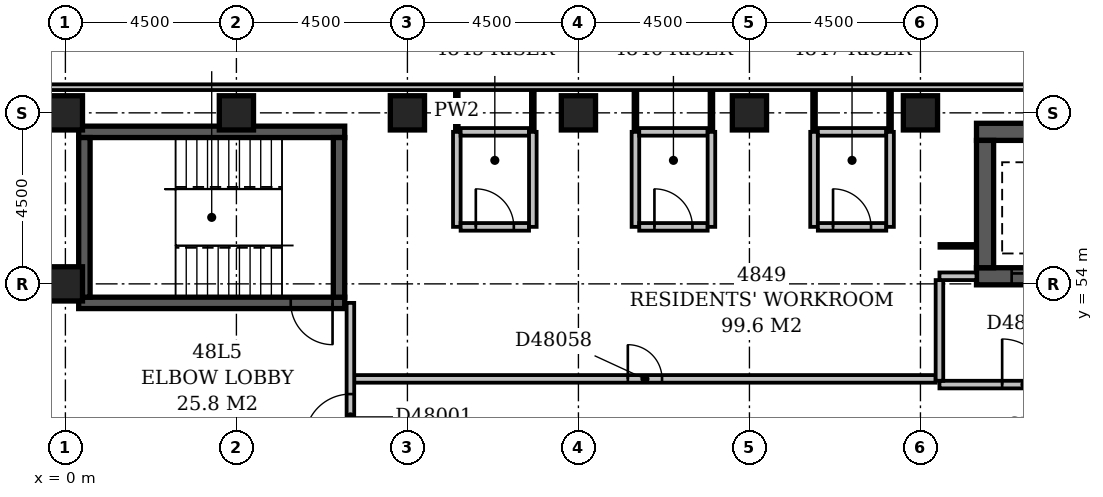
"""IFC4 building model, lengths in metres.
Left out: names, types, materials, properties, quantities, classifications, styles, units other than length and angle.
Written with IfcOpenShell. Run it as: python <this file> out.ifc"""

import sys

from ifc_helpers import new_model, si_unit, direction, frame, frame_2d, origin, origin_2d, place, context, subcontext, project, spatial, rectangle, extrude, element, fill, save


model = new_model("IFC4")
c1 = context("Model", 3, precision=1e-05, world=origin(), true_north=direction((0.0, 1.0)))
c2 = subcontext(c1, "Body", "Model", "MODEL_VIEW")
j1 = project(units=[si_unit("LENGTHUNIT", "METRE"), si_unit("PLANEANGLEUNIT", "RADIAN")], contexts=[c1])
p1 = place(None, origin())
s1 = spatial("IfcSite", under=j1, at=p1, CompositionType="ELEMENT")
p2 = place(p1, origin())
s2 = spatial("IfcBuilding", under=s1, at=p2, CompositionType="ELEMENT")
p3 = place(p2, frame((0.0, 0.0, 189.8)))
s3 = spatial("IfcBuildingStorey", under=s2, at=p3, CompositionType="ELEMENT", Elevation=189.8)
p4 = place(p3, frame((0.35, 53.5, -0.3), z_axis=(0.0, 0.0, 1.0), x_axis=(1.0, 0.0, 0.0)))
e1 = element("IfcWall", 1, at=p4, inside=s3, PredefinedType="SHEAR", context=c2, shape_type="SweptSolid", body=[
    extrude(rectangle(XDim=7.0, YDim=0.3, at=frame_2d((3.5, 0.0))), origin(), (0.0, 0.0, 1.0), 3.6),
])
p5 = place(p4, frame((5.58, 0.0, 0.3)))
e2 = element("IfcOpeningElement", 2, at=p5, cuts=e1, PredefinedType="OPENING", context=c2, shape_type="SweptSolid", body=[
    extrude(rectangle(XDim=1.1, YDim=2.1, at=frame_2d((0.55, 1.05))), frame((0.0, 0.162, 0.0), z_axis=(0.0, -1.0, 0.0), x_axis=(1.0, 0.0, 0.0)), (0.0, 0.0, 1.0), 0.324),
])
p6 = place(p3, frame((0.35, 58.0, -0.3), z_axis=(0.0, 0.0, 1.0), x_axis=(1.0, 0.0, 0.0)))
e3 = element("IfcWall", 3, at=p6, inside=s3, PredefinedType="SHEAR", context=c2, shape_type="SweptSolid", body=[
    extrude(rectangle(XDim=7.0, YDim=0.3, at=frame_2d((3.5, 0.0))), origin(), (0.0, 0.0, 1.0), 3.6),
])
for number, where, z_axis, x_axis in (
    (4, (0.5, 53.65, -0.3), (0.0, 0.0, 1.0), (0.0, 1.0, 0.0)),
    (5, (7.2, 53.65, -0.3), (0.0, 0.0, 1.0), (0.0, 1.0, 0.0)),
):
    element("IfcWall", number, at=place(p3, frame(where, z_axis=z_axis, x_axis=x_axis)), inside=s3, PredefinedType="SHEAR", context=c2, shape_type="SweptSolid", body=[
        extrude(rectangle(XDim=4.2, YDim=0.3, at=frame_2d((2.1, 0.0))), origin(), (0.0, 0.0, 1.0), 3.6),
    ])
p7 = place(p3, frame((23.975, 54.2, -0.3), z_axis=(0.0, 0.0, 1.0), x_axis=(1.0, 0.0, 0.0)))
e6 = element("IfcWall", 6, at=p7, inside=s3, PredefinedType="SHEAR", context=c2, shape_type="SweptSolid", body=[
    extrude(rectangle(XDim=2.95, YDim=0.45, at=frame_2d((1.475, 0.0))), origin(), (0.0, 0.0, 1.0), 3.6),
])
p8 = place(p7, frame((0.925, 0.0, 0.3)))
e7 = element("IfcOpeningElement", 7, at=p8, cuts=e6, PredefinedType="OPENING", context=c2, shape_type="SweptSolid", body=[
    extrude(rectangle(XDim=1.1, YDim=2.1, at=frame_2d((0.55, 1.05))), frame((0.0, 0.237, 0.0), z_axis=(0.0, -1.0, 0.0), x_axis=(1.0, 0.0, 0.0)), (0.0, 0.0, 1.0), 0.474),
])
p9 = place(p3, frame((23.975, 58.0, -0.3), z_axis=(0.0, 0.0, 1.0), x_axis=(1.0, 0.0, 0.0)))
e8 = element("IfcWall", 8, at=p9, inside=s3, PredefinedType="SHEAR", context=c2, shape_type="SweptSolid", body=[
    extrude(rectangle(XDim=2.95, YDim=0.45, at=frame_2d((1.475, 0.0))), origin(), (0.0, 0.0, 1.0), 3.6),
])
p10 = place(p3, frame((24.2, 54.425, -0.3), z_axis=(0.0, 0.0, 1.0), x_axis=(0.0, 1.0, 0.0)))
e9 = element("IfcWall", 9, at=p10, inside=s3, PredefinedType="SHEAR", context=c2, shape_type="SweptSolid", body=[
    extrude(rectangle(XDim=3.35, YDim=0.45, at=frame_2d((1.675, 0.0))), origin(), (0.0, 0.0, 1.0), 3.6),
])
for number, where, z_axis, x_axis in (
    (10, (0.0, 54.0, -0.3), (0.0, 0.0, 1.0), (1.0, 0.0, 0.0)),
    (11, (0.0, 58.5, -0.3), (0.0, 0.0, 1.0), (1.0, 0.0, 0.0)),
    (12, (4.5, 58.5, -0.3), (0.0, 0.0, 1.0), (1.0, 0.0, 0.0)),
    (13, (9.0, 58.5, -0.3), (0.0, 0.0, 1.0), (1.0, 0.0, 0.0)),
    (14, (13.5, 58.5, -0.3), (0.0, 0.0, 1.0), (1.0, 0.0, 0.0)),
    (15, (18.0, 58.5, -0.3), (0.0, 0.0, 1.0), (1.0, 0.0, 0.0)),
    (16, (22.5, 58.5, -0.3), (0.0, 0.0, 1.0), (1.0, 0.0, 0.0)),
):
    element("IfcColumn", number, at=place(p3, frame(where, z_axis=z_axis, x_axis=x_axis)), inside=s3, PredefinedType="COLUMN", context=c2, shape_type="SweptSolid", body=[
        extrude(rectangle(XDim=0.9, YDim=0.9, at=origin_2d()), origin(), (0.0, 0.0, 1.0), 3.6),
    ])
p11 = place(p3, frame((50.1, 59.175, 0.0), z_axis=(0.0, 0.0, 1.0), x_axis=(-1.0, 0.0, 0.0)))
e17 = element("IfcWall", 17, at=p11, inside=s3, PredefinedType="STANDARD", context=c2, shape_type="SweptSolid", body=[
    extrude(rectangle(XDim=50.85, YDim=0.15, at=frame_2d((25.425, 0.0))), origin(), (0.0, 0.0, 1.0), 2.7),
])
p12 = place(p11, frame((19.65, 0.0, 0.6)))
e18 = element("IfcOpeningElement", 18, at=p12, cuts=e17, PredefinedType="OPENING", context=c2, shape_type="SweptSolid", body=[
    extrude(rectangle(XDim=2.4, YDim=1.8, at=frame_2d((1.2, 0.9))), frame((0.0, 0.087, 0.0), z_axis=(0.0, -1.0, 0.0), x_axis=(1.0, 0.0, 0.0)), (0.0, 0.0, 1.0), 0.174),
])
p13 = place(p3, frame((23.0, 51.35, 0.0), z_axis=(0.0, 0.0, 1.0), x_axis=(1.0, 0.0, 0.0)))
e19 = element("IfcWall", 19, at=p13, inside=s3, PredefinedType="PARTITIONING", context=c2, shape_type="SweptSolid", body=[
    extrude(rectangle(XDim=4.8, YDim=0.2, at=frame_2d((2.4, 0.0))), origin(), (0.0, 0.0, 1.0), 3.3),
])
p14 = place(p13, frame((1.65, 0.0, 0.0)))
e20 = element("IfcOpeningElement", 20, at=p14, cuts=e19, PredefinedType="OPENING", context=c2, shape_type="SweptSolid", body=[
    extrude(rectangle(XDim=1.2, YDim=2.1, at=frame_2d((0.6, 1.05))), frame((0.0, 0.112, 0.0), z_axis=(0.0, -1.0, 0.0), x_axis=(1.0, 0.0, 0.0)), (0.0, 0.0, 1.0), 0.224),
])
p15 = place(p3, frame((23.0, 54.2, 0.0), z_axis=(0.0, 0.0, 1.0), x_axis=(1.0, 0.0, 0.0)))
e21 = element("IfcWall", 21, at=p15, inside=s3, PredefinedType="PARTITIONING", context=c2, shape_type="SweptSolid", body=[
    extrude(rectangle(XDim=0.975, YDim=0.2, at=frame_2d((0.488, 0.0))), origin(), (0.0, 0.0, 1.0), 3.3),
])
p16 = place(p3, frame((23.0, 51.45, 0.0), z_axis=(0.0, 0.0, 1.0), x_axis=(0.0, 1.0, 0.0)))
e22 = element("IfcWall", 22, at=p16, inside=s3, PredefinedType="PARTITIONING", context=c2, shape_type="SweptSolid", body=[
    extrude(rectangle(XDim=2.65, YDim=0.2, at=frame_2d((1.325, 0.0))), origin(), (0.0, 0.0, 1.0), 3.3),
])
p17 = place(p3, frame((7.5, 49.6, 0.0), z_axis=(0.0, 0.0, 1.0), x_axis=(0.0, 1.0, 0.0)))
e23 = element("IfcWall", 23, at=p17, inside=s3, PredefinedType="PARTITIONING", context=c2, shape_type="SweptSolid", body=[
    extrude(rectangle(XDim=3.9, YDim=0.2, at=frame_2d((1.95, 0.0))), origin(), (0.0, 0.0, 1.0), 3.3),
])
p18 = place(p17, frame((0.3, 0.0, 0.0)))
e24 = element("IfcOpeningElement", 24, at=p18, cuts=e23, PredefinedType="OPENING", context=c2, shape_type="SweptSolid", body=[
    extrude(rectangle(XDim=1.2, YDim=2.1, at=frame_2d((0.6, 1.05))), frame((0.0, 0.112, 0.0), z_axis=(0.0, -1.0, 0.0), x_axis=(1.0, 0.0, 0.0)), (0.0, 0.0, 1.0), 0.224),
])
p19 = place(p3, frame((7.6, 51.5, 0.0), z_axis=(0.0, 0.0, 1.0), x_axis=(1.0, 0.0, 0.0)))
e25 = element("IfcWall", 25, at=p19, inside=s3, PredefinedType="PARTITIONING", context=c2, shape_type="SweptSolid", body=[
    extrude(rectangle(XDim=15.3, YDim=0.2, at=frame_2d((7.65, 0.0))), origin(), (0.0, 0.0, 1.0), 3.3),
])
p20 = place(p19, frame((7.2, 0.0, 0.0)))
e26 = element("IfcOpeningElement", 26, at=p20, cuts=e25, PredefinedType="OPENING", context=c2, shape_type="SweptSolid", body=[
    extrude(rectangle(XDim=0.9, YDim=2.1, at=frame_2d((0.45, 1.05))), frame((0.0, 0.112, 0.0), z_axis=(0.0, -1.0, 0.0), x_axis=(1.0, 0.0, 0.0)), (0.0, 0.0, 1.0), 0.224),
])
p21 = place(p3, frame((23.0, 55.0, 0.0), z_axis=(0.0, 0.0, 1.0), x_axis=(1.0, 0.0, 0.0)))
e27 = element("IfcWall", 27, at=p21, inside=s3, PredefinedType="PARTITIONING", context=c2, shape_type="SweptSolid", body=[
    extrude(rectangle(XDim=0.975, YDim=0.1, at=frame_2d((0.488, 0.0))), origin(), (0.0, 0.0, 1.0), 3.3),
])
p22 = place(p3, frame((10.3, 55.5, 0.0), z_axis=(0.0, 0.0, 1.0), x_axis=(0.0, 1.0, 0.0)))
e28 = element("IfcWall", 28, at=p22, inside=s3, PredefinedType="PARTITIONING", context=c2, shape_type="SweptSolid", body=[
    extrude(rectangle(XDim=2.5, YDim=0.2, at=frame_2d((1.25, 0.0))), origin(), (0.0, 0.0, 1.0), 3.3),
])
p23 = place(p3, frame((10.4, 55.5, 0.0), z_axis=(0.0, 0.0, 1.0), x_axis=(1.0, 0.0, 0.0)))
e29 = element("IfcWall", 29, at=p23, inside=s3, PredefinedType="PARTITIONING", context=c2, shape_type="SweptSolid", body=[
    extrude(rectangle(XDim=1.8, YDim=0.2, at=frame_2d((0.9, 0.0))), origin(), (0.0, 0.0, 1.0), 3.3),
])
p24 = place(p23, frame((0.4, 0.0, 0.0)))
e30 = element("IfcOpeningElement", 30, at=p24, cuts=e29, PredefinedType="OPENING", context=c2, shape_type="SweptSolid", body=[
    extrude(rectangle(XDim=1.0, YDim=2.1, at=frame_2d((0.5, 1.05))), frame((0.0, 0.112, 0.0), z_axis=(0.0, -1.0, 0.0), x_axis=(1.0, 0.0, 0.0)), (0.0, 0.0, 1.0), 0.224),
])
for number, where, z_axis, x_axis in (
    (31, (12.3, 55.5, 0.0), (0.0, 0.0, 1.0), (0.0, 1.0, 0.0)),
    (32, (15.0, 55.5, 0.0), (0.0, 0.0, 1.0), (0.0, 1.0, 0.0)),
):
    element("IfcWall", number, at=place(p3, frame(where, z_axis=z_axis, x_axis=x_axis)), inside=s3, PredefinedType="PARTITIONING", context=c2, shape_type="SweptSolid", body=[
        extrude(rectangle(XDim=2.5, YDim=0.2, at=frame_2d((1.25, 0.0))), origin(), (0.0, 0.0, 1.0), 3.3),
    ])
p25 = place(p3, frame((15.1, 55.5, 0.0), z_axis=(0.0, 0.0, 1.0), x_axis=(1.0, 0.0, 0.0)))
e33 = element("IfcWall", 33, at=p25, inside=s3, PredefinedType="PARTITIONING", context=c2, shape_type="SweptSolid", body=[
    extrude(rectangle(XDim=1.8, YDim=0.2, at=frame_2d((0.9, 0.0))), origin(), (0.0, 0.0, 1.0), 3.3),
])
p26 = place(p25, frame((0.4, 0.0, 0.0)))
e34 = element("IfcOpeningElement", 34, at=p26, cuts=e33, PredefinedType="OPENING", context=c2, shape_type="SweptSolid", body=[
    extrude(rectangle(XDim=1.0, YDim=2.1, at=frame_2d((0.5, 1.05))), frame((0.0, 0.112, 0.0), z_axis=(0.0, -1.0, 0.0), x_axis=(1.0, 0.0, 0.0)), (0.0, 0.0, 1.0), 0.224),
])
for number, where, z_axis, x_axis in (
    (35, (17.0, 55.5, 0.0), (0.0, 0.0, 1.0), (0.0, 1.0, 0.0)),
    (36, (19.7, 55.5, 0.0), (0.0, 0.0, 1.0), (0.0, 1.0, 0.0)),
):
    element("IfcWall", number, at=place(p3, frame(where, z_axis=z_axis, x_axis=x_axis)), inside=s3, PredefinedType="PARTITIONING", context=c2, shape_type="SweptSolid", body=[
        extrude(rectangle(XDim=2.5, YDim=0.2, at=frame_2d((1.25, 0.0))), origin(), (0.0, 0.0, 1.0), 3.3),
    ])
p27 = place(p3, frame((19.8, 55.5, 0.0), z_axis=(0.0, 0.0, 1.0), x_axis=(1.0, 0.0, 0.0)))
e37 = element("IfcWall", 37, at=p27, inside=s3, PredefinedType="PARTITIONING", context=c2, shape_type="SweptSolid", body=[
    extrude(rectangle(XDim=1.8, YDim=0.2, at=frame_2d((0.9, 0.0))), origin(), (0.0, 0.0, 1.0), 3.3),
])
p28 = place(p27, frame((0.4, 0.0, 0.0)))
e38 = element("IfcOpeningElement", 38, at=p28, cuts=e37, PredefinedType="OPENING", context=c2, shape_type="SweptSolid", body=[
    extrude(rectangle(XDim=1.0, YDim=2.1, at=frame_2d((0.5, 1.05))), frame((0.0, 0.112, 0.0), z_axis=(0.0, -1.0, 0.0), x_axis=(1.0, 0.0, 0.0)), (0.0, 0.0, 1.0), 0.224),
])
p29 = place(p3, frame((21.7, 55.5, 0.0), z_axis=(0.0, 0.0, 1.0), x_axis=(0.0, 1.0, 0.0)))
e39 = element("IfcWall", 39, at=p29, inside=s3, PredefinedType="PARTITIONING", context=c2, shape_type="SweptSolid", body=[
    extrude(rectangle(XDim=2.5, YDim=0.2, at=frame_2d((1.25, 0.0))), origin(), (0.0, 0.0, 1.0), 3.3),
])
p30 = place(p3, frame((10.3, 58.0, 0.0), z_axis=(0.0, 0.0, 1.0), x_axis=(0.0, 1.0, 0.0)))
e40 = element("IfcWall", 40, at=p30, inside=s3, PredefinedType="PARTITIONING", context=c2, shape_type="SweptSolid", body=[
    extrude(rectangle(XDim=1.1, YDim=0.1, at=frame_2d((0.55, 0.0))), origin(), (0.0, 0.0, 1.0), 3.3),
])
p31 = place(p3, frame((10.4, 58.0, 0.0), z_axis=(0.0, 0.0, 1.0), x_axis=(1.0, 0.0, 0.0)))
e41 = element("IfcWall", 41, at=p31, inside=s3, PredefinedType="PARTITIONING", context=c2, shape_type="SweptSolid", body=[
    extrude(rectangle(XDim=1.8, YDim=0.2, at=frame_2d((0.9, 0.0))), origin(), (0.0, 0.0, 1.0), 3.3),
])
for number, where, z_axis, x_axis in (
    (42, (12.3, 58.0, 0.0), (0.0, 0.0, 1.0), (0.0, 1.0, 0.0)),
    (43, (15.0, 58.0, 0.0), (0.0, 0.0, 1.0), (0.0, 1.0, 0.0)),
):
    element("IfcWall", number, at=place(p3, frame(where, z_axis=z_axis, x_axis=x_axis)), inside=s3, PredefinedType="PARTITIONING", context=c2, shape_type="SweptSolid", body=[
        extrude(rectangle(XDim=1.1, YDim=0.1, at=frame_2d((0.55, 0.0))), origin(), (0.0, 0.0, 1.0), 3.3),
    ])
p32 = place(p3, frame((15.1, 58.0, 0.0), z_axis=(0.0, 0.0, 1.0), x_axis=(1.0, 0.0, 0.0)))
e44 = element("IfcWall", 44, at=p32, inside=s3, PredefinedType="PARTITIONING", context=c2, shape_type="SweptSolid", body=[
    extrude(rectangle(XDim=1.8, YDim=0.2, at=frame_2d((0.9, 0.0))), origin(), (0.0, 0.0, 1.0), 3.3),
])
for number, where, z_axis, x_axis in (
    (45, (17.0, 58.0, 0.0), (0.0, 0.0, 1.0), (0.0, 1.0, 0.0)),
    (46, (19.7, 58.0, 0.0), (0.0, 0.0, 1.0), (0.0, 1.0, 0.0)),
):
    element("IfcWall", number, at=place(p3, frame(where, z_axis=z_axis, x_axis=x_axis)), inside=s3, PredefinedType="PARTITIONING", context=c2, shape_type="SweptSolid", body=[
        extrude(rectangle(XDim=1.1, YDim=0.1, at=frame_2d((0.55, 0.0))), origin(), (0.0, 0.0, 1.0), 3.3),
    ])
p33 = place(p3, frame((19.8, 58.0, 0.0), z_axis=(0.0, 0.0, 1.0), x_axis=(1.0, 0.0, 0.0)))
e47 = element("IfcWall", 47, at=p33, inside=s3, PredefinedType="PARTITIONING", context=c2, shape_type="SweptSolid", body=[
    extrude(rectangle(XDim=1.8, YDim=0.2, at=frame_2d((0.9, 0.0))), origin(), (0.0, 0.0, 1.0), 3.3),
])
p34 = place(p3, frame((21.7, 58.0, 0.0), z_axis=(0.0, 0.0, 1.0), x_axis=(0.0, 1.0, 0.0)))
e48 = element("IfcWall", 48, at=p34, inside=s3, PredefinedType="PARTITIONING", context=c2, shape_type="SweptSolid", body=[
    extrude(rectangle(XDim=1.1, YDim=0.1, at=frame_2d((0.55, 0.0))), origin(), (0.0, 0.0, 1.0), 3.3),
])
p35 = place(p18, origin())
e49 = element("IfcDoor", 49, at=p35, inside=s3, OperationType="SINGLE_SWING_LEFT", PredefinedType="DOOR", context=c2, shape_type="SweptSolid", body=[
    extrude(rectangle(XDim=1.2, YDim=2.1, at=frame_2d((0.6, 1.05))), frame((0.0, 0.025, 0.0), z_axis=(0.0, -1.0, 0.0), x_axis=(1.0, 0.0, 0.0)), (0.0, 0.0, 1.0), 0.05),
])
fill(e24, e49)
p36 = place(p14, origin())
e50 = element("IfcDoor", 50, at=p36, inside=s3, OperationType="SINGLE_SWING_LEFT", PredefinedType="DOOR", context=c2, shape_type="SweptSolid", body=[
    extrude(rectangle(XDim=1.2, YDim=2.1, at=frame_2d((0.6, 1.05))), frame((0.0, 0.025, 0.0), z_axis=(0.0, -1.0, 0.0), x_axis=(1.0, 0.0, 0.0)), (0.0, 0.0, 1.0), 0.05),
])
fill(e20, e50)
p37 = place(p8, origin())
e51 = element("IfcDoor", 51, at=p37, inside=s3, OperationType="SLIDING_TO_LEFT", PredefinedType="DOOR", context=c2, shape_type="SweptSolid", body=[
    extrude(rectangle(XDim=1.1, YDim=2.1, at=frame_2d((0.55, 1.05))), frame((0.0, 0.025, 0.0), z_axis=(0.0, -1.0, 0.0), x_axis=(1.0, 0.0, 0.0)), (0.0, 0.0, 1.0), 0.05),
])
fill(e7, e51)
p38 = place(p5, origin())
e52 = element("IfcDoor", 52, at=p38, inside=s3, OperationType="SINGLE_SWING_RIGHT", PredefinedType="DOOR", context=c2, shape_type="SweptSolid", body=[
    extrude(rectangle(XDim=1.1, YDim=2.1, at=frame_2d((0.55, 1.05))), frame((0.0, 0.025, 0.0), z_axis=(0.0, -1.0, 0.0), x_axis=(1.0, 0.0, 0.0)), (0.0, 0.0, 1.0), 0.05),
])
fill(e2, e52)
p39 = place(p20, origin())
e53 = element("IfcDoor", 53, at=p39, inside=s3, OperationType="SINGLE_SWING_LEFT", PredefinedType="DOOR", context=c2, shape_type="SweptSolid", body=[
    extrude(rectangle(XDim=0.9, YDim=2.1, at=frame_2d((0.45, 1.05))), frame((0.0, 0.025, 0.0), z_axis=(0.0, -1.0, 0.0), x_axis=(1.0, 0.0, 0.0)), (0.0, 0.0, 1.0), 0.05),
])
fill(e26, e53)
p40 = place(p24, origin())
e54 = element("IfcDoor", 54, at=p40, inside=s3, OperationType="SINGLE_SWING_LEFT", PredefinedType="DOOR", context=c2, shape_type="SweptSolid", body=[
    extrude(rectangle(XDim=1.0, YDim=2.1, at=frame_2d((0.5, 1.05))), frame((0.0, 0.025, 0.0), z_axis=(0.0, -1.0, 0.0), x_axis=(1.0, 0.0, 0.0)), (0.0, 0.0, 1.0), 0.05),
])
fill(e30, e54)
p41 = place(p26, origin())
e55 = element("IfcDoor", 55, at=p41, inside=s3, OperationType="SINGLE_SWING_LEFT", PredefinedType="DOOR", context=c2, shape_type="SweptSolid", body=[
    extrude(rectangle(XDim=1.0, YDim=2.1, at=frame_2d((0.5, 1.05))), frame((0.0, 0.025, 0.0), z_axis=(0.0, -1.0, 0.0), x_axis=(1.0, 0.0, 0.0)), (0.0, 0.0, 1.0), 0.05),
])
fill(e34, e55)
p42 = place(p28, origin())
e56 = element("IfcDoor", 56, at=p42, inside=s3, OperationType="SINGLE_SWING_LEFT", PredefinedType="DOOR", context=c2, shape_type="SweptSolid", body=[
    extrude(rectangle(XDim=1.0, YDim=2.1, at=frame_2d((0.5, 1.05))), frame((0.0, 0.025, 0.0), z_axis=(0.0, -1.0, 0.0), x_axis=(1.0, 0.0, 0.0)), (0.0, 0.0, 1.0), 0.05),
])
fill(e38, e56)
save(model, sys.argv[1])
